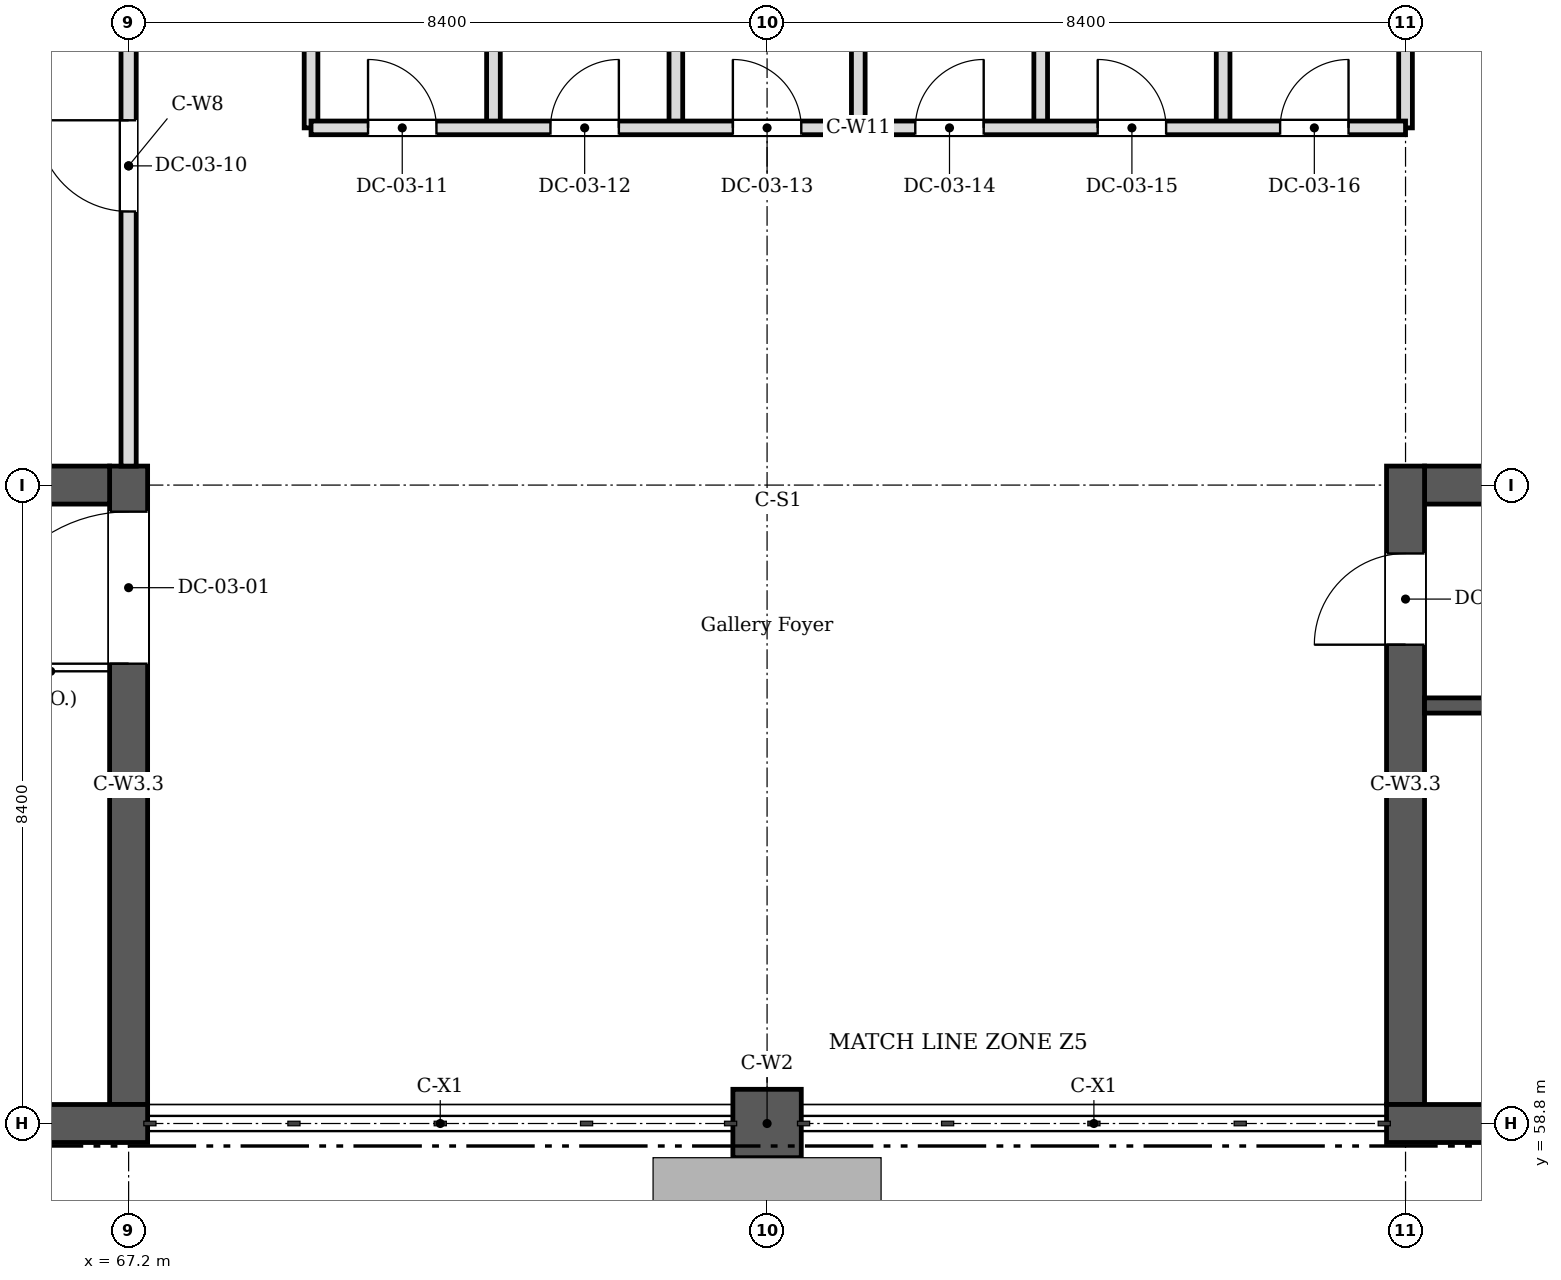
"""IFC4 building model, lengths in metres.
Left out: names, types, materials, properties, quantities, classifications, styles, units other than length and angle.
Written with IfcOpenShell. Run it as: python <this file> out.ifc"""

import sys

from ifc_helpers import new_model, si_unit, direction, frame, frame_2d, origin, place, context, subcontext, project, spatial, rectangle, extrude, element, fill, save


model = new_model("IFC4")
c1 = context("Model", 3, precision=1e-05, world=origin(), true_north=direction((0.0, 1.0)))
c2 = subcontext(c1, "Body", "Model", "MODEL_VIEW")
j1 = project(units=[si_unit("LENGTHUNIT", "METRE"), si_unit("PLANEANGLEUNIT", "RADIAN")], contexts=[c1])
p1 = place(None, origin())
s1 = spatial("IfcSite", under=j1, at=p1, CompositionType="ELEMENT")
p2 = place(p1, origin())
s2 = spatial("IfcBuilding", under=s1, at=p2, CompositionType="ELEMENT")
p3 = place(p2, frame((0.0, 0.0, 14.4)))
s3 = spatial("IfcBuildingStorey", under=s2, at=p3, CompositionType="ELEMENT", Elevation=14.4)
p4 = place(p3, frame((67.45, 58.8, 0.0), z_axis=(0.0, 0.0, 1.0), x_axis=(-1.0, 0.0, 0.0)))
e1 = element("IfcWall", 1, at=p4, inside=s3, PredefinedType="SOLIDWALL", context=c2, shape_type="SweptSolid", body=[
    extrude(rectangle(XDim=8.9, YDim=0.5, at=frame_2d((4.45, 0.0))), origin(), (0.0, 0.0, 1.0), 4.2),
])
p5 = place(p4, frame((4.0, 0.0, 0.9)))
e2 = element("IfcOpeningElement", 2, at=p5, cuts=e1, PredefinedType="OPENING", context=c2, shape_type="SweptSolid", body=[
    extrude(rectangle(XDim=0.9, YDim=2.4, at=frame_2d((0.45, 1.2))), frame((0.0, 0.26, 0.0), z_axis=(0.0, -1.0, 0.0), x_axis=(1.0, 0.0, 0.0)), (0.0, 0.0, 1.0), 0.52),
])
p6 = place(p3, frame((92.65, 58.8, 0.0), z_axis=(0.0, 0.0, 1.0), x_axis=(-1.0, 0.0, 0.0)))
e3 = element("IfcWall", 3, at=p6, inside=s3, PredefinedType="SOLIDWALL", context=c2, shape_type="SweptSolid", body=[
    extrude(rectangle(XDim=8.9, YDim=0.5, at=frame_2d((4.45, 0.0))), origin(), (0.0, 0.0, 1.0), 4.2),
])
p7 = place(p3, frame((75.15, 58.8, 0.0), z_axis=(0.0, 0.0, 1.0), x_axis=(1.0, 0.0, 0.0)))
e4 = element("IfcWall", 4, at=p7, inside=s3, PredefinedType="SOLIDWALL", context=c2, shape_type="SweptSolid", body=[
    extrude(rectangle(XDim=0.9, YDim=0.9, at=frame_2d((0.45, 0.0))), origin(), (0.0, 0.0, 1.0), 4.2),
])
p8 = place(p3, frame((67.2, 59.05, 0.0), z_axis=(0.0, 0.0, 1.0), x_axis=(0.0, 1.0, 0.0)))
e5 = element("IfcWall", 5, at=p8, inside=s3, PredefinedType="SOLIDWALL", context=c2, shape_type="SweptSolid", body=[
    extrude(rectangle(XDim=8.4, YDim=0.5, at=frame_2d((4.2, 0.0))), origin(), (0.0, 0.0, 1.0), 3.8),
])
p9 = place(p8, frame((5.8, 0.0, 0.0)))
e6 = element("IfcOpeningElement", 6, at=p9, cuts=e5, PredefinedType="OPENING", context=c2, shape_type="SweptSolid", body=[
    extrude(rectangle(XDim=2.0, YDim=2.1, at=frame_2d((1.0, 1.05))), frame((0.0, 0.26, 0.0), z_axis=(0.0, -1.0, 0.0), x_axis=(1.0, 0.0, 0.0)), (0.0, 0.0, 1.0), 0.52),
])
p10 = place(p3, frame((59.05, 67.2, 0.0), z_axis=(0.0, 0.0, 1.0), x_axis=(1.0, 0.0, 0.0)))
e7 = element("IfcWall", 7, at=p10, inside=s3, PredefinedType="SOLIDWALL", context=c2, shape_type="SweptSolid", body=[
    extrude(rectangle(XDim=7.9, YDim=0.5, at=frame_2d((3.95, 0.0))), origin(), (0.0, 0.0, 1.0), 3.8),
])
p11 = place(p3, frame((84.0, 59.05, 0.0), z_axis=(0.0, 0.0, 1.0), x_axis=(0.0, 1.0, 0.0)))
e8 = element("IfcWall", 8, at=p11, inside=s3, PredefinedType="SOLIDWALL", context=c2, shape_type="SweptSolid", body=[
    extrude(rectangle(XDim=8.4, YDim=0.5, at=frame_2d((4.2, 0.0))), origin(), (0.0, 0.0, 1.0), 3.8),
])
p12 = place(p11, frame((6.05, 0.0, 0.0)))
e9 = element("IfcOpeningElement", 9, at=p12, cuts=e8, PredefinedType="OPENING", context=c2, shape_type="SweptSolid", body=[
    extrude(rectangle(XDim=1.2, YDim=2.1, at=frame_2d((0.6, 1.05))), frame((0.0, 0.26, 0.0), z_axis=(0.0, -1.0, 0.0), x_axis=(1.0, 0.0, 0.0)), (0.0, 0.0, 1.0), 0.52),
])
p13 = place(p3, frame((84.25, 67.2, 0.0), z_axis=(0.0, 0.0, 1.0), x_axis=(1.0, 0.0, 0.0)))
e10 = element("IfcWall", 10, at=p13, inside=s3, PredefinedType="SOLIDWALL", context=c2, shape_type="SweptSolid", body=[
    extrude(rectangle(XDim=7.9, YDim=0.5, at=frame_2d((3.95, 0.0))), origin(), (0.0, 0.0, 1.0), 3.8),
])
p14 = place(p3, frame((84.25, 64.3, 0.0), z_axis=(0.0, 0.0, 1.0), x_axis=(1.0, 0.0, 0.0)))
e11 = element("IfcWall", 11, at=p14, inside=s3, PredefinedType="PARTITIONING", context=c2, shape_type="SweptSolid", body=[
    extrude(rectangle(XDim=7.9, YDim=0.2, at=frame_2d((3.95, 0.0))), origin(), (0.0, 0.0, 1.0), 3.8),
])
p15 = place(p14, frame((1.375, 0.0, 0.0)))
e12 = element("IfcOpeningElement", 12, at=p15, cuts=e11, PredefinedType="OPENING", context=c2, shape_type="SweptSolid", body=[
    extrude(rectangle(XDim=1.1, YDim=2.1, at=frame_2d((0.55, 1.05))), frame((0.0, 0.11, 0.0), z_axis=(0.0, -1.0, 0.0), x_axis=(1.0, 0.0, 0.0)), (0.0, 0.0, 1.0), 0.22),
])
p16 = place(p14, frame((5.425, 0.0, 0.0)))
e13 = element("IfcOpeningElement", 13, at=p16, cuts=e11, PredefinedType="OPENING", context=c2, shape_type="SweptSolid", body=[
    extrude(rectangle(XDim=1.1, YDim=2.1, at=frame_2d((0.55, 1.05))), frame((0.0, 0.11, 0.0), z_axis=(0.0, -1.0, 0.0), x_axis=(1.0, 0.0, 0.0)), (0.0, 0.0, 1.0), 0.22),
])
p17 = place(p3, frame((67.2, 67.45, 0.0), z_axis=(0.0, 0.0, 1.0), x_axis=(0.0, 1.0, 0.0)))
e14 = element("IfcWall", 14, at=p17, inside=s3, PredefinedType="PARTITIONING", context=c2, shape_type="SweptSolid", body=[
    extrude(rectangle(XDim=7.9, YDim=0.2, at=frame_2d((3.95, 0.0))), origin(), (0.0, 0.0, 1.0), 2.85),
])
p18 = place(p17, frame((3.35, 0.0, 0.0)))
e15 = element("IfcOpeningElement", 15, at=p18, cuts=e14, PredefinedType="OPENING", context=c2, shape_type="SweptSolid", body=[
    extrude(rectangle(XDim=1.2, YDim=2.1, at=frame_2d((0.6, 1.05))), frame((0.0, 0.11, 0.0), z_axis=(0.0, -1.0, 0.0), x_axis=(1.0, 0.0, 0.0)), (0.0, 0.0, 1.0), 0.22),
])
for number, where, z_axis, x_axis in (
    (16, (69.6, 71.9, 0.0), (0.0, 0.0, 1.0), (0.0, 1.0, 0.0)),
    (17, (72.0, 71.9, 0.0), (0.0, 0.0, 1.0), (0.0, 1.0, 0.0)),
    (18, (74.4, 71.9, 0.0), (0.0, 0.0, 1.0), (0.0, 1.0, 0.0)),
    (19, (76.8, 71.9, 0.0), (0.0, 0.0, 1.0), (0.0, 1.0, 0.0)),
    (20, (79.2, 71.9, 0.0), (0.0, 0.0, 1.0), (0.0, 1.0, 0.0)),
    (21, (81.6, 71.9, 0.0), (0.0, 0.0, 1.0), (0.0, 1.0, 0.0)),
    (22, (84.0, 71.9, 0.0), (0.0, 0.0, 1.0), (0.0, 1.0, 0.0)),
):
    element("IfcWall", number, at=place(p3, frame(where, z_axis=z_axis, x_axis=x_axis)), inside=s3, PredefinedType="PARTITIONING", context=c2, shape_type="SweptSolid", body=[
        extrude(rectangle(XDim=3.45, YDim=0.18, at=frame_2d((1.725, 0.0))), origin(), (0.0, 0.0, 1.0), 2.85),
    ])
p19 = place(p3, frame((69.6, 71.9, 0.0), z_axis=(0.0, 0.0, 1.0), x_axis=(1.0, 0.0, 0.0)))
e23 = element("IfcWall", 23, at=p19, inside=s3, PredefinedType="PARTITIONING", context=c2, shape_type="SweptSolid", body=[
    extrude(rectangle(XDim=14.4, YDim=0.18, at=frame_2d((7.2, 0.0))), origin(), (0.0, 0.0, 1.0), 2.85),
])
p20 = place(p19, frame((0.75, 0.0, 0.0)))
e24 = element("IfcOpeningElement", 24, at=p20, cuts=e23, PredefinedType="OPENING", context=c2, shape_type="SweptSolid", body=[
    extrude(rectangle(XDim=0.9, YDim=2.1, at=frame_2d((0.45, 1.05))), frame((0.0, 0.1, 0.0), z_axis=(0.0, -1.0, 0.0), x_axis=(1.0, 0.0, 0.0)), (0.0, 0.0, 1.0), 0.2),
])
p21 = place(p19, frame((3.15, 0.0, 0.0)))
e25 = element("IfcOpeningElement", 25, at=p21, cuts=e23, PredefinedType="OPENING", context=c2, shape_type="SweptSolid", body=[
    extrude(rectangle(XDim=0.9, YDim=2.1, at=frame_2d((0.45, 1.05))), frame((0.0, 0.1, 0.0), z_axis=(0.0, -1.0, 0.0), x_axis=(1.0, 0.0, 0.0)), (0.0, 0.0, 1.0), 0.2),
])
p22 = place(p19, frame((5.55, 0.0, 0.0)))
e26 = element("IfcOpeningElement", 26, at=p22, cuts=e23, PredefinedType="OPENING", context=c2, shape_type="SweptSolid", body=[
    extrude(rectangle(XDim=0.9, YDim=2.1, at=frame_2d((0.45, 1.05))), frame((0.0, 0.1, 0.0), z_axis=(0.0, -1.0, 0.0), x_axis=(1.0, 0.0, 0.0)), (0.0, 0.0, 1.0), 0.2),
])
p23 = place(p19, frame((7.95, 0.0, 0.0)))
e27 = element("IfcOpeningElement", 27, at=p23, cuts=e23, PredefinedType="OPENING", context=c2, shape_type="SweptSolid", body=[
    extrude(rectangle(XDim=0.9, YDim=2.1, at=frame_2d((0.45, 1.05))), frame((0.0, 0.1, 0.0), z_axis=(0.0, -1.0, 0.0), x_axis=(1.0, 0.0, 0.0)), (0.0, 0.0, 1.0), 0.2),
])
p24 = place(p19, frame((10.35, 0.0, 0.0)))
e28 = element("IfcOpeningElement", 28, at=p24, cuts=e23, PredefinedType="OPENING", context=c2, shape_type="SweptSolid", body=[
    extrude(rectangle(XDim=0.9, YDim=2.1, at=frame_2d((0.45, 1.05))), frame((0.0, 0.1, 0.0), z_axis=(0.0, -1.0, 0.0), x_axis=(1.0, 0.0, 0.0)), (0.0, 0.0, 1.0), 0.2),
])
p25 = place(p19, frame((12.75, 0.0, 0.0)))
e29 = element("IfcOpeningElement", 29, at=p25, cuts=e23, PredefinedType="OPENING", context=c2, shape_type="SweptSolid", body=[
    extrude(rectangle(XDim=0.9, YDim=2.1, at=frame_2d((0.45, 1.05))), frame((0.0, 0.1, 0.0), z_axis=(0.0, -1.0, 0.0), x_axis=(1.0, 0.0, 0.0)), (0.0, 0.0, 1.0), 0.2),
])
p26 = place(p9, origin())
e30 = element("IfcDoor", 30, at=p26, inside=s3, OperationType="DOUBLE_DOOR_DOUBLE_SWING", PredefinedType="DOOR", context=c2, shape_type="SweptSolid", body=[
    extrude(rectangle(XDim=2.0, YDim=2.1, at=frame_2d((1.0, 1.05))), frame((0.0, 0.025, 0.0), z_axis=(0.0, -1.0, 0.0), x_axis=(1.0, 0.0, 0.0)), (0.0, 0.0, 1.0), 0.05),
])
fill(e6, e30)
p27 = place(p12, origin())
e31 = element("IfcDoor", 31, at=p27, inside=s3, OperationType="SINGLE_SWING_LEFT", PredefinedType="DOOR", context=c2, shape_type="SweptSolid", body=[
    extrude(rectangle(XDim=1.2, YDim=2.1, at=frame_2d((0.6, 1.05))), frame((0.0, 0.025, 0.0), z_axis=(0.0, -1.0, 0.0), x_axis=(1.0, 0.0, 0.0)), (0.0, 0.0, 1.0), 0.05),
])
fill(e9, e31)
p28 = place(p18, origin())
e32 = element("IfcDoor", 32, at=p28, inside=s3, OperationType="SINGLE_SWING_LEFT", PredefinedType="DOOR", context=c2, shape_type="SweptSolid", body=[
    extrude(rectangle(XDim=1.2, YDim=2.1, at=frame_2d((0.6, 1.05))), frame((0.0, 0.025, 0.0), z_axis=(0.0, -1.0, 0.0), x_axis=(1.0, 0.0, 0.0)), (0.0, 0.0, 1.0), 0.05),
])
fill(e15, e32)
p29 = place(p20, origin())
e33 = element("IfcDoor", 33, at=p29, inside=s3, OperationType="SINGLE_SWING_LEFT", PredefinedType="DOOR", context=c2, shape_type="SweptSolid", body=[
    extrude(rectangle(XDim=0.9, YDim=2.1, at=frame_2d((0.45, 1.05))), frame((0.0, 0.025, 0.0), z_axis=(0.0, -1.0, 0.0), x_axis=(1.0, 0.0, 0.0)), (0.0, 0.0, 1.0), 0.05),
])
fill(e24, e33)
p30 = place(p21, origin())
e34 = element("IfcDoor", 34, at=p30, inside=s3, OperationType="SINGLE_SWING_LEFT", PredefinedType="DOOR", context=c2, shape_type="SweptSolid", body=[
    extrude(rectangle(XDim=0.9, YDim=2.1, at=frame_2d((0.45, 1.05))), frame((0.0, 0.025, 0.0), z_axis=(0.0, -1.0, 0.0), x_axis=(1.0, 0.0, 0.0)), (0.0, 0.0, 1.0), 0.05),
])
fill(e25, e34)
p31 = place(p22, origin())
e35 = element("IfcDoor", 35, at=p31, inside=s3, OperationType="SINGLE_SWING_LEFT", PredefinedType="DOOR", context=c2, shape_type="SweptSolid", body=[
    extrude(rectangle(XDim=0.9, YDim=2.1, at=frame_2d((0.45, 1.05))), frame((0.0, 0.025, 0.0), z_axis=(0.0, -1.0, 0.0), x_axis=(1.0, 0.0, 0.0)), (0.0, 0.0, 1.0), 0.05),
])
fill(e26, e35)
p32 = place(p23, origin())
e36 = element("IfcDoor", 36, at=p32, inside=s3, OperationType="SINGLE_SWING_LEFT", PredefinedType="DOOR", context=c2, shape_type="SweptSolid", body=[
    extrude(rectangle(XDim=0.9, YDim=2.1, at=frame_2d((0.45, 1.05))), frame((0.0, 0.025, 0.0), z_axis=(0.0, -1.0, 0.0), x_axis=(1.0, 0.0, 0.0)), (0.0, 0.0, 1.0), 0.05),
])
fill(e27, e36)
p33 = place(p24, origin())
e37 = element("IfcDoor", 37, at=p33, inside=s3, OperationType="SINGLE_SWING_LEFT", PredefinedType="DOOR", context=c2, shape_type="SweptSolid", body=[
    extrude(rectangle(XDim=0.9, YDim=2.1, at=frame_2d((0.45, 1.05))), frame((0.0, 0.025, 0.0), z_axis=(0.0, -1.0, 0.0), x_axis=(1.0, 0.0, 0.0)), (0.0, 0.0, 1.0), 0.05),
])
fill(e28, e37)
p34 = place(p25, origin())
e38 = element("IfcDoor", 38, at=p34, inside=s3, OperationType="SINGLE_SWING_LEFT", PredefinedType="DOOR", context=c2, shape_type="SweptSolid", body=[
    extrude(rectangle(XDim=0.9, YDim=2.1, at=frame_2d((0.45, 1.05))), frame((0.0, 0.025, 0.0), z_axis=(0.0, -1.0, 0.0), x_axis=(1.0, 0.0, 0.0)), (0.0, 0.0, 1.0), 0.05),
])
fill(e29, e38)
save(model, sys.argv[1])
